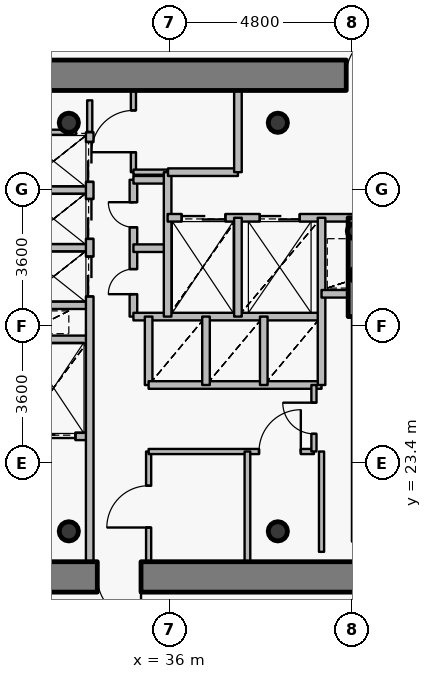
"""IFC4 building model, lengths in metres.
Left out: names, types, materials, properties, quantities, classifications, styles, units other than length and angle.
Written with IfcOpenShell. Run it as: python <this file> out.ifc"""

import sys

from ifc_helpers import new_model, si_unit, direction, frame, frame_2d, origin, origin_2d, place, context, subcontext, project, spatial, rectangle, hollow_circle, extrude, source, transform, mapped, element, fill, save


model = new_model("IFC4")
c1 = context("Model", 3, precision=1e-05, world=origin(), true_north=direction((0.0, 1.0)))
c2 = subcontext(c1, "Body", "Model", "MODEL_VIEW")
j1 = project(units=[si_unit("LENGTHUNIT", "METRE"), si_unit("PLANEANGLEUNIT", "RADIAN")], contexts=[c1])
p1 = place(None, origin())
s1 = spatial("IfcSite", under=j1, at=p1, CompositionType="ELEMENT")
p2 = place(p1, origin())
s2 = spatial("IfcBuilding", under=s1, at=p2, CompositionType="ELEMENT")
p3 = place(p2, frame((0.0, 0.0, 163.65)))
s3 = spatial("IfcBuildingStorey", under=s2, at=p3, CompositionType="ELEMENT", Elevation=163.65)
for number, where, z_axis, x_axis in (
    (1, (33.35, 21.6, 0.0), (0.0, 0.0, 1.0), (1.0, 0.0, 0.0)),
    (2, (38.85, 21.6, 0.0), (0.0, 0.0, 1.0), (1.0, 0.0, 0.0)),
    (3, (38.85, 32.35, 0.0), (0.0, 0.0, 1.0), (1.0, 0.0, 0.0)),
    (4, (33.35, 32.35, 0.0), (0.0, 0.0, 1.0), (1.0, 0.0, 0.0)),
):
    element("IfcColumn", number, at=place(p3, frame(where, z_axis=z_axis, x_axis=x_axis)), inside=s3, PredefinedType="COLUMN", context=c2, shape_type="SweptSolid", body=[
        extrude(hollow_circle(Radius=0.254, WallThickness=0.02, at=origin_2d()), origin(), (0.0, 0.0, 1.0), 3.75),
    ])
for number, where, z_axis, x_axis in (
    (5, (40.95, 28.35, 0.0), (0.0, 0.0, 1.0), (1.0, 0.0, 0.0)),
    (6, (40.88, 29.5, 0.0), (0.0, 0.0, 1.0), (1.0, 0.0, 0.0)),
):
    element("IfcColumn", number, at=place(p3, frame(where, z_axis=z_axis, x_axis=x_axis)), inside=s3, PredefinedType="COLUMN", context=c2, shape_type="SweptSolid", body=[
        extrude(hollow_circle(Radius=0.203, WallThickness=0.016, at=origin_2d()), origin(), (0.0, 0.0, 1.0), 3.75),
    ])
p4 = place(p3, frame((27.2, 33.6, 0.0), z_axis=(0.0, 0.0, 1.0), x_axis=(1.0, 0.0, 0.0)))
e7 = element("IfcWall", 7, at=p4, inside=s3, PredefinedType="SHEAR", context=c2, shape_type="SweptSolid", body=[
    extrude(rectangle(XDim=17.6, YDim=0.8, at=frame_2d((8.8, 0.0))), origin(), (0.0, 0.0, 1.0), 2.95),
])
p5 = place(p4, frame((13.45, 0.0, 0.0)))
e8 = element("IfcOpeningElement", 8, at=p5, cuts=e7, PredefinedType="OPENING", context=c2, shape_type="SweptSolid", body=[
    extrude(rectangle(XDim=1.15, YDim=2.15, at=origin_2d()), frame((0.575, 0.41, 1.075), z_axis=(0.0, -1.0, 0.0), x_axis=(1.0, 0.0, 0.0)), (0.0, 0.0, 1.0), 0.82),
])
p6 = place(p3, frame((44.8, 20.4, 0.0), z_axis=(0.0, 0.0, 1.0), x_axis=(-1.0, 0.0, 0.0)))
e9 = element("IfcWall", 9, at=p6, inside=s3, PredefinedType="SHEAR", context=c2, shape_type="SweptSolid", body=[
    extrude(rectangle(XDim=17.6, YDim=0.8, at=frame_2d((8.8, 0.0))), origin(), (0.0, 0.0, 1.0), 2.95),
])
p7 = place(p6, frame((9.55, 0.0, 0.0)))
e10 = element("IfcOpeningElement", 10, at=p7, cuts=e9, PredefinedType="OPENING", context=c2, shape_type="SweptSolid", body=[
    extrude(rectangle(XDim=1.15, YDim=2.15, at=origin_2d()), frame((0.575, 0.41, 1.075), z_axis=(0.0, -1.0, 0.0), x_axis=(1.0, 0.0, 0.0)), (0.0, 0.0, 1.0), 0.82),
])
p8 = place(p3, frame((40.9, 27.25, 0.0), z_axis=(0.0, 0.0, 1.0), x_axis=(0.0, 1.0, 0.0)))
e11 = element("IfcWall", 11, at=p8, inside=s3, PredefinedType="SHEAR", context=c2, shape_type="SweptSolid", body=[
    extrude(rectangle(XDim=2.6, YDim=0.4, at=frame_2d((1.3, 0.0))), origin(), (0.0, 0.0, 1.0), 3.1),
])
p9 = place(p3, frame((32.0, 24.1, 0.0), z_axis=(0.0, 0.0, 1.0), x_axis=(1.0, 0.0, 0.0)))
e12 = element("IfcWall", 12, at=p9, inside=s3, PredefinedType="PARTITIONING", context=c2, shape_type="SweptSolid", body=[
    extrude(rectangle(XDim=1.9, YDim=0.2, at=frame_2d((0.95, 0.0))), origin(), (0.0, 0.0, 1.0), 3.085),
])
p10 = place(p9, frame((0.375, 0.0, 0.0)))
e13 = element("IfcOpeningElement", 13, at=p10, cuts=e12, PredefinedType="OPENING", context=c2, shape_type="SweptSolid", body=[
    extrude(rectangle(XDim=1.15, YDim=2.15, at=origin_2d()), frame((0.575, 0.11, 1.075), z_axis=(0.0, -1.0, 0.0), x_axis=(1.0, 0.0, 0.0)), (0.0, 0.0, 1.0), 0.22),
])
for number, where, z_axis, x_axis in (
    (14, (32.0, 26.65, 0.0), (0.0, 0.0, 1.0), (1.0, 0.0, 0.0)),
    (15, (32.0, 27.55, 0.0), (0.0, 0.0, 1.0), (1.0, 0.0, 0.0)),
    (16, (32.0, 29.06, 0.0), (0.0, 0.0, 1.0), (1.0, 0.0, 0.0)),
    (17, (32.0, 30.58, 0.0), (0.0, 0.0, 1.0), (1.0, 0.0, 0.0)),
):
    element("IfcWall", number, at=place(p3, frame(where, z_axis=z_axis, x_axis=x_axis)), inside=s3, PredefinedType="PARTITIONING", context=c2, shape_type="SweptSolid", body=[
        extrude(rectangle(XDim=1.9, YDim=0.2, at=frame_2d((0.95, 0.0))), origin(), (0.0, 0.0, 1.0), 3.085),
    ])
p11 = place(p3, frame((33.9, 20.8, 0.0), z_axis=(0.0, 0.0, 1.0), x_axis=(0.0, 1.0, 0.0)))
e18 = element("IfcWall", 18, at=p11, inside=s3, PredefinedType="PARTITIONING", context=c2, shape_type="SweptSolid", body=[
    extrude(rectangle(XDim=11.3, YDim=0.2, at=frame_2d((5.65, 0.0))), origin(), (0.0, 0.0, 1.0), 3.085),
])
p12 = place(p11, frame((6.98, 0.0, 0.0)))
e19 = element("IfcOpeningElement", 19, at=p12, cuts=e18, PredefinedType="OPENING", context=c2, shape_type="SweptSolid", body=[
    extrude(rectangle(XDim=1.05, YDim=2.15, at=origin_2d()), frame((0.525, 0.11, 1.075), z_axis=(0.0, -1.0, 0.0), x_axis=(1.0, 0.0, 0.0)), (0.0, 0.0, 1.0), 0.22),
])
p13 = place(p11, frame((8.495, 0.0, 0.0)))
e20 = element("IfcOpeningElement", 20, at=p13, cuts=e18, PredefinedType="OPENING", context=c2, shape_type="SweptSolid", body=[
    extrude(rectangle(XDim=1.05, YDim=2.15, at=origin_2d()), frame((0.525, 0.11, 1.075), z_axis=(0.0, -1.0, 0.0), x_axis=(1.0, 0.0, 0.0)), (0.0, 0.0, 1.0), 0.22),
])
p14 = place(p11, frame((9.995, 0.0, 0.0)))
e21 = element("IfcOpeningElement", 21, at=p14, cuts=e18, PredefinedType="OPENING", context=c2, shape_type="SweptSolid", body=[
    extrude(rectangle(XDim=1.05, YDim=2.15, at=origin_2d()), frame((0.525, 0.11, 1.075), z_axis=(0.0, -1.0, 0.0), x_axis=(1.0, 0.0, 0.0)), (0.0, 0.0, 1.0), 0.22),
])
p15 = place(p3, frame((35.05, 27.25, 0.0), z_axis=(0.0, 0.0, 1.0), x_axis=(0.0, 1.0, 0.0)))
e22 = element("IfcWall", 22, at=p15, inside=s3, PredefinedType="PARTITIONING", context=c2, shape_type="SweptSolid", body=[
    extrude(rectangle(XDim=3.6, YDim=0.2, at=frame_2d((1.8, 0.0))), origin(), (0.0, 0.0, 1.0), 3.5),
])
p16 = place(p15, frame((0.59, 0.0, 0.0)))
e23 = element("IfcOpeningElement", 23, at=p16, cuts=e22, PredefinedType="OPENING", context=c2, shape_type="SweptSolid", body=[
    extrude(rectangle(XDim=0.66, YDim=2.05, at=origin_2d()), frame((0.33, 0.11, 1.025), z_axis=(0.0, -1.0, 0.0), x_axis=(1.0, 0.0, 0.0)), (0.0, 0.0, 1.0), 0.22),
])
p17 = place(p15, frame((2.35, 0.0, 0.0)))
e24 = element("IfcOpeningElement", 24, at=p17, cuts=e22, PredefinedType="OPENING", context=c2, shape_type="SweptSolid", body=[
    extrude(rectangle(XDim=0.66, YDim=2.05, at=origin_2d()), frame((0.33, 0.11, 1.025), z_axis=(0.0, -1.0, 0.0), x_axis=(1.0, 0.0, 0.0)), (0.0, 0.0, 1.0), 0.22),
])
p18 = place(p3, frame((35.05, 27.25, 0.0), z_axis=(0.0, 0.0, 1.0), x_axis=(1.0, 0.0, 0.0)))
e25 = element("IfcWall", 25, at=p18, inside=s3, PredefinedType="PARTITIONING", context=c2, shape_type="SweptSolid", body=[
    extrude(rectangle(XDim=4.95, YDim=0.2, at=frame_2d((2.475, 0.0))), origin(), (0.0, 0.0, 1.0), 3.085),
])
for number, where, z_axis, x_axis in (
    (26, (35.05, 29.05, 0.0), (0.0, 0.0, 1.0), (1.0, 0.0, 0.0)),
    (27, (35.05, 30.85, 0.0), (0.0, 0.0, 1.0), (1.0, 0.0, 0.0)),
):
    element("IfcWall", number, at=place(p3, frame(where, z_axis=z_axis, x_axis=x_axis)), inside=s3, PredefinedType="PARTITIONING", context=c2, shape_type="SweptSolid", body=[
        extrude(rectangle(XDim=0.9, YDim=0.2, at=frame_2d((0.45, 0.0))), origin(), (0.0, 0.0, 1.0), 3.5),
    ])
p19 = place(p3, frame((35.05, 31.05, 0.0), z_axis=(0.0, 0.0, 1.0), x_axis=(0.0, 1.0, 0.0)))
e28 = element("IfcWall", 28, at=p19, inside=s3, PredefinedType="PARTITIONING", context=c2, shape_type="SweptSolid", body=[
    extrude(rectangle(XDim=2.15, YDim=0.135, at=frame_2d((1.075, 0.0))), origin(), (0.0, 0.0, 1.0), 3.085),
])
p20 = place(p19, frame((0.525, 0.0, 0.0)))
e29 = element("IfcOpeningElement", 29, at=p20, cuts=e28, PredefinedType="OPENING", context=c2, shape_type="SweptSolid", body=[
    extrude(rectangle(XDim=1.1, YDim=2.15, at=origin_2d()), frame((0.55, 0.078, 1.075), z_axis=(0.0, -1.0, 0.0), x_axis=(1.0, 0.0, 0.0)), (0.0, 0.0, 1.0), 0.155),
])
p21 = place(p3, frame((35.05, 31.05, 0.0), z_axis=(0.0, 0.0, 1.0), x_axis=(1.0, 0.0, 0.0)))
e30 = element("IfcWall", 30, at=p21, inside=s3, PredefinedType="PARTITIONING", context=c2, shape_type="SweptSolid", body=[
    extrude(rectangle(XDim=0.9, YDim=0.135, at=frame_2d((0.45, 0.0))), origin(), (0.0, 0.0, 1.0), 3.5),
])
p22 = place(p3, frame((35.45, 20.8, 0.0), z_axis=(0.0, 0.0, 1.0), x_axis=(0.0, 1.0, 0.0)))
e31 = element("IfcWall", 31, at=p22, inside=s3, PredefinedType="PARTITIONING", context=c2, shape_type="SweptSolid", body=[
    extrude(rectangle(XDim=2.9, YDim=0.135, at=frame_2d((1.45, 0.0))), origin(), (0.0, 0.0, 1.0), 3.085),
])
p23 = place(p22, frame((0.9, 0.0, 0.0)))
e32 = element("IfcOpeningElement", 32, at=p23, cuts=e31, PredefinedType="OPENING", context=c2, shape_type="SweptSolid", body=[
    extrude(rectangle(XDim=1.1, YDim=2.15, at=origin_2d()), frame((0.55, 0.078, 1.075), z_axis=(0.0, -1.0, 0.0), x_axis=(1.0, 0.0, 0.0)), (0.0, 0.0, 1.0), 0.155),
])
p24 = place(p3, frame((35.45, 23.7, 0.0), z_axis=(0.0, 0.0, 1.0), x_axis=(1.0, 0.0, 0.0)))
e33 = element("IfcWall", 33, at=p24, inside=s3, PredefinedType="PARTITIONING", context=c2, shape_type="SweptSolid", body=[
    extrude(rectangle(XDim=4.35, YDim=0.135, at=frame_2d((2.175, 0.0))), origin(), (0.0, 0.0, 1.0), 3.085),
])
p25 = place(p24, frame((2.905, 0.0, 0.0)))
e34 = element("IfcOpeningElement", 34, at=p25, cuts=e33, PredefinedType="OPENING", context=c2, shape_type="SweptSolid", body=[
    extrude(rectangle(XDim=1.1, YDim=2.15, at=origin_2d()), frame((0.55, 0.078, 1.075), z_axis=(0.0, -1.0, 0.0), x_axis=(1.0, 0.0, 0.0)), (0.0, 0.0, 1.0), 0.155),
])
p26 = place(p3, frame((35.45, 25.45, 0.0), z_axis=(0.0, 0.0, 1.0), x_axis=(0.0, 1.0, 0.0)))
e35 = element("IfcWall", 35, at=p26, inside=s3, PredefinedType="PARTITIONING", context=c2, shape_type="SweptSolid", body=[
    extrude(rectangle(XDim=1.8, YDim=0.2, at=frame_2d((0.9, 0.0))), origin(), (0.0, 0.0, 1.0), 3.5),
])
p27 = place(p3, frame((35.45, 25.45, 0.0), z_axis=(0.0, 0.0, 1.0), x_axis=(1.0, 0.0, 0.0)))
e36 = element("IfcWall", 36, at=p27, inside=s3, PredefinedType="PARTITIONING", context=c2, shape_type="SweptSolid", body=[
    extrude(rectangle(XDim=4.55, YDim=0.2, at=frame_2d((2.275, 0.0))), origin(), (0.0, 0.0, 1.0), 3.085),
])
p28 = place(p3, frame((35.95, 27.25, 0.0), z_axis=(0.0, 0.0, 1.0), x_axis=(0.0, 1.0, 0.0)))
e37 = element("IfcWall", 37, at=p28, inside=s3, PredefinedType="PARTITIONING", context=c2, shape_type="SweptSolid", body=[
    extrude(rectangle(XDim=3.8, YDim=0.2, at=frame_2d((1.9, 0.0))), origin(), (0.0, 0.0, 1.0), 3.5),
])
p29 = place(p3, frame((35.95, 29.85, 0.0), z_axis=(0.0, 0.0, 1.0), x_axis=(1.0, 0.0, 0.0)))
e38 = element("IfcWall", 38, at=p29, inside=s3, PredefinedType="PARTITIONING", context=c2, shape_type="SweptSolid", body=[
    extrude(rectangle(XDim=8.49, YDim=0.2, at=frame_2d((4.245, 0.0))), origin(), (0.0, 0.0, 1.0), 3.085),
])
p30 = place(p29, frame((6.1, 0.0, 0.0)))
e39 = element("IfcOpeningElement", 39, at=p30, cuts=e38, PredefinedType="OPENING", context=c2, shape_type="SweptSolid", body=[
    extrude(rectangle(XDim=1.2, YDim=2.15, at=origin_2d()), frame((0.6, 0.11, 1.075), z_axis=(0.0, -1.0, 0.0), x_axis=(1.0, 0.0, 0.0)), (0.0, 0.0, 1.0), 0.22),
])
p31 = place(p29, frame((0.37, 0.0, 0.0)))
e40 = element("IfcOpeningElement", 40, at=p31, cuts=e38, PredefinedType="OPENING", context=c2, shape_type="SweptSolid", body=[
    extrude(rectangle(XDim=1.15, YDim=2.15, at=origin_2d()), frame((0.575, 0.11, 1.075), z_axis=(0.0, -1.0, 0.0), x_axis=(1.0, 0.0, 0.0)), (0.0, 0.0, 1.0), 0.22),
])
p32 = place(p29, frame((2.425, 0.0, 0.0)))
e41 = element("IfcOpeningElement", 41, at=p32, cuts=e38, PredefinedType="OPENING", context=c2, shape_type="SweptSolid", body=[
    extrude(rectangle(XDim=1.05, YDim=2.15, at=origin_2d()), frame((0.525, 0.11, 1.075), z_axis=(0.0, -1.0, 0.0), x_axis=(1.0, 0.0, 0.0)), (0.0, 0.0, 1.0), 0.22),
])
p33 = place(p3, frame((35.96, 31.05, 0.0), z_axis=(0.0, 0.0, 1.0), x_axis=(1.0, 0.0, 0.0)))
e42 = element("IfcWall", 42, at=p33, inside=s3, PredefinedType="PARTITIONING", context=c2, shape_type="SweptSolid", body=[
    extrude(rectangle(XDim=1.84, YDim=0.2, at=frame_2d((0.92, 0.0))), origin(), (0.0, 0.0, 1.0), 3.5),
])
p34 = place(p3, frame((36.96, 25.45, 0.0), z_axis=(0.0, 0.0, 1.0), x_axis=(0.0, 1.0, 0.0)))
e43 = element("IfcWall", 43, at=p34, inside=s3, PredefinedType="PARTITIONING", context=c2, shape_type="SweptSolid", body=[
    extrude(rectangle(XDim=1.8, YDim=0.2, at=frame_2d((0.9, 0.0))), origin(), (0.0, 0.0, 1.0), 3.5),
])
p35 = place(p3, frame((37.8, 27.25, 0.0), z_axis=(0.0, 0.0, 1.0), x_axis=(0.0, 1.0, 0.0)))
e44 = element("IfcWall", 44, at=p35, inside=s3, PredefinedType="PARTITIONING", context=c2, shape_type="SweptSolid", body=[
    extrude(rectangle(XDim=2.6, YDim=0.2, at=frame_2d((1.3, 0.0))), origin(), (0.0, 0.0, 1.0), 3.5),
])
p36 = place(p3, frame((37.8, 31.05, 0.0), z_axis=(0.0, 0.0, 1.0), x_axis=(0.0, 1.0, 0.0)))
e45 = element("IfcWall", 45, at=p36, inside=s3, PredefinedType="PARTITIONING", context=c2, shape_type="SweptSolid", body=[
    extrude(rectangle(XDim=2.15, YDim=0.2, at=frame_2d((1.075, 0.0))), origin(), (0.0, 0.0, 1.0), 3.085),
])
p37 = place(p3, frame((38.05, 20.18, 0.0), z_axis=(0.0, 0.0, 1.0), x_axis=(0.0, 1.0, 0.0)))
e46 = element("IfcWall", 46, at=p37, inside=s3, PredefinedType="PARTITIONING", context=c2, shape_type="SweptSolid", body=[
    extrude(rectangle(XDim=3.52, YDim=0.15, at=frame_2d((1.76, 0.0))), origin(), (0.0, 0.0, 1.0), 2.935),
])
p38 = place(p3, frame((38.48, 25.45, 0.0), z_axis=(0.0, 0.0, 1.0), x_axis=(0.0, 1.0, 0.0)))
e47 = element("IfcWall", 47, at=p38, inside=s3, PredefinedType="PARTITIONING", context=c2, shape_type="SweptSolid", body=[
    extrude(rectangle(XDim=1.8, YDim=0.2, at=frame_2d((0.9, 0.0))), origin(), (0.0, 0.0, 1.0), 3.5),
])
p39 = place(p3, frame((39.8, 23.7, 0.0), z_axis=(0.0, 0.0, 1.0), x_axis=(0.0, 1.0, 0.0)))
e48 = element("IfcWall", 48, at=p39, inside=s3, PredefinedType="PARTITIONING", context=c2, shape_type="SweptSolid", body=[
    extrude(rectangle(XDim=1.75, YDim=0.135, at=frame_2d((0.875, 0.0))), origin(), (0.0, 0.0, 1.0), 3.5),
])
p40 = place(p39, frame((0.465, 0.0, 0.0)))
e49 = element("IfcOpeningElement", 49, at=p40, cuts=e48, PredefinedType="OPENING", context=c2, shape_type="SweptSolid", body=[
    extrude(rectangle(XDim=0.82, YDim=2.1, at=origin_2d()), frame((0.41, 0.078, 1.05), z_axis=(0.0, -1.0, 0.0), x_axis=(1.0, 0.0, 0.0)), (0.0, 0.0, 1.0), 0.155),
])
p41 = place(p3, frame((40.0, 25.45, 0.0), z_axis=(0.0, 0.0, 1.0), x_axis=(0.0, 1.0, 0.0)))
e50 = element("IfcWall", 50, at=p41, inside=s3, PredefinedType="PARTITIONING", context=c2, shape_type="SweptSolid", body=[
    extrude(rectangle(XDim=4.4, YDim=0.2, at=frame_2d((2.2, 0.0))), origin(), (0.0, 0.0, 1.0), 3.5),
])
p42 = place(p3, frame((40.0, 27.85, 0.0), z_axis=(0.0, 0.0, 1.0), x_axis=(1.0, 0.0, 0.0)))
e51 = element("IfcWall", 51, at=p42, inside=s3, PredefinedType="PARTITIONING", context=c2, shape_type="SweptSolid", body=[
    extrude(rectangle(XDim=0.9, YDim=0.2, at=frame_2d((0.45, 0.0))), origin(), (0.0, 0.0, 1.0), 3.5),
])
p43 = place(p3, frame((40.9, 21.33, 0.0), z_axis=(0.0, 0.0, 1.0), x_axis=(0.0, 1.0, 0.0)))
e52 = element("IfcWall", 52, at=p43, inside=s3, PredefinedType="PARTITIONING", context=c2, shape_type="SweptSolid", body=[
    extrude(rectangle(XDim=5.91, YDim=0.2, at=frame_2d((2.955, 0.0))), origin(), (0.0, 0.0, 1.0), 3.035),
])
p44 = place(p3, frame((32.36, 32.1, 0.0), z_axis=(0.0, 0.0, 1.0), x_axis=(1.0, 0.0, 0.0)))
e53 = element("IfcWall", 53, at=p44, inside=s3, PredefinedType="PARTITIONING", context=c2, shape_type="SweptSolid", body=[
    extrude(rectangle(XDim=1.18, YDim=0.135, at=frame_2d((0.59, 0.0))), origin(), (0.0, 0.0, 1.0), 3.085),
])
p45 = place(p3, frame((40.0, 23.7, 0.0), z_axis=(0.0, 0.0, 1.0), x_axis=(0.0, -1.0, 0.0)))
e54 = element("IfcWall", 54, at=p45, inside=s3, PredefinedType="PARTITIONING", context=c2, shape_type="SweptSolid", body=[
    extrude(rectangle(XDim=2.64, YDim=0.135, at=frame_2d((1.32, 0.0))), origin(), (0.0, 0.0, 1.0), 3.035),
])
p46 = place(p3, frame((33.9, 32.11, 0.0), z_axis=(0.0, 0.0, 1.0), x_axis=(0.0, 1.0, 0.0)))
e55 = element("IfcWall", 55, at=p46, inside=s3, PredefinedType="PARTITIONING", context=c2, shape_type="SweptSolid", body=[
    extrude(rectangle(XDim=0.83, YDim=0.135, at=frame_2d((0.415, 0.0))), origin(), (0.0, 0.0, 1.0), 3.085),
])
m1 = source(origin(), c2, "Body", "SweptSolid", [
    extrude(rectangle(XDim=1.15, YDim=2.15, at=origin_2d()), frame((0.575, 0.025, 1.075), z_axis=(0.0, -1.0, 0.0), x_axis=(1.0, 0.0, 0.0)), (0.0, 0.0, 1.0), 0.05),
])
p47 = place(p5, origin())
e56 = element("IfcDoor", 56, at=p47, inside=s3, OperationType="SINGLE_SWING_RIGHT", PredefinedType="DOOR", context=c2, shape_type="MappedRepresentation", body=[
    mapped(m1, transform((0.0, 0.0, 0.0), x_axis=(1.0, 0.0, 0.0), y_axis=(0.0, 1.0, 0.0), z_axis=(0.0, 0.0, 1.0), scale=1.0)),
])
fill(e8, e56)
p48 = place(p7, origin())
e57 = element("IfcDoor", 57, at=p48, inside=s3, OperationType="SINGLE_SWING_LEFT", PredefinedType="DOOR", context=c2, shape_type="MappedRepresentation", body=[
    mapped(m1, transform((0.0, 0.0, 0.0), x_axis=(1.0, 0.0, 0.0), y_axis=(0.0, 1.0, 0.0), z_axis=(0.0, 0.0, 1.0), scale=1.0)),
])
fill(e10, e57)
m2 = source(origin(), c2, "Body", "SweptSolid", [
    extrude(rectangle(XDim=1.15, YDim=2.15, at=origin_2d()), frame((0.575, 0.025, 1.075), z_axis=(0.0, -1.0, 0.0), x_axis=(1.0, 0.0, 0.0)), (0.0, 0.0, 1.0), 0.05),
])
p49 = place(p31, origin())
e58 = element("IfcDoor", 58, at=p49, inside=s3, OperationType="DOUBLE_DOOR_SLIDING", PredefinedType="USERDEFINED", context=c2, shape_type="MappedRepresentation", body=[
    mapped(m2, transform((0.0, 0.0, 0.0), x_axis=(1.0, 0.0, 0.0), y_axis=(0.0, 1.0, 0.0), z_axis=(0.0, 0.0, 1.0), scale=1.0)),
])
fill(e40, e58)
p50 = place(p10, origin())
e59 = element("IfcDoor", 59, at=p50, inside=s3, OperationType="DOUBLE_DOOR_SLIDING", PredefinedType="USERDEFINED", context=c2, shape_type="MappedRepresentation", body=[
    mapped(m2, transform((0.0, 0.0, 0.0), x_axis=(1.0, 0.0, 0.0), y_axis=(0.0, 1.0, 0.0), z_axis=(0.0, 0.0, 1.0), scale=1.0)),
])
fill(e13, e59)
m3 = source(origin(), c2, "Body", "SweptSolid", [
    extrude(rectangle(XDim=1.05, YDim=2.15, at=origin_2d()), frame((0.525, 0.025, 1.075), z_axis=(0.0, -1.0, 0.0), x_axis=(1.0, 0.0, 0.0)), (0.0, 0.0, 1.0), 0.05),
])
p51 = place(p32, origin())
e60 = element("IfcDoor", 60, at=p51, inside=s3, OperationType="DOUBLE_DOOR_SLIDING", PredefinedType="USERDEFINED", context=c2, shape_type="MappedRepresentation", body=[
    mapped(m3, transform((0.0, 0.0, 0.0), x_axis=(1.0, 0.0, 0.0), y_axis=(0.0, 1.0, 0.0), z_axis=(0.0, 0.0, 1.0), scale=1.0)),
])
fill(e41, e60)
p52 = place(p12, origin())
e61 = element("IfcDoor", 61, at=p52, inside=s3, OperationType="DOUBLE_DOOR_SLIDING", PredefinedType="USERDEFINED", context=c2, shape_type="MappedRepresentation", body=[
    mapped(m3, transform((0.0, 0.0, 0.0), x_axis=(1.0, 0.0, 0.0), y_axis=(0.0, 1.0, 0.0), z_axis=(0.0, 0.0, 1.0), scale=1.0)),
])
fill(e19, e61)
p53 = place(p13, origin())
e62 = element("IfcDoor", 62, at=p53, inside=s3, OperationType="DOUBLE_DOOR_SLIDING", PredefinedType="USERDEFINED", context=c2, shape_type="MappedRepresentation", body=[
    mapped(m3, transform((0.0, 0.0, 0.0), x_axis=(1.0, 0.0, 0.0), y_axis=(0.0, 1.0, 0.0), z_axis=(0.0, 0.0, 1.0), scale=1.0)),
])
fill(e20, e62)
p54 = place(p14, origin())
e63 = element("IfcDoor", 63, at=p54, inside=s3, OperationType="DOUBLE_DOOR_SLIDING", PredefinedType="USERDEFINED", context=c2, shape_type="MappedRepresentation", body=[
    mapped(m3, transform((0.0, 0.0, 0.0), x_axis=(1.0, 0.0, 0.0), y_axis=(0.0, 1.0, 0.0), z_axis=(0.0, 0.0, 1.0), scale=1.0)),
])
fill(e21, e63)
m4 = source(origin(), c2, "Body", "SweptSolid", [
    extrude(rectangle(XDim=0.66, YDim=2.05, at=origin_2d()), frame((0.33, 0.025, 1.025), z_axis=(0.0, -1.0, 0.0), x_axis=(1.0, 0.0, 0.0)), (0.0, 0.0, 1.0), 0.05),
])
p55 = place(p16, origin())
e64 = element("IfcDoor", 64, at=p55, inside=s3, OperationType="SINGLE_SWING_LEFT", PredefinedType="USERDEFINED", context=c2, shape_type="MappedRepresentation", body=[
    mapped(m4, transform((0.0, 0.0, 0.0), x_axis=(1.0, 0.0, 0.0), y_axis=(0.0, 1.0, 0.0), z_axis=(0.0, 0.0, 1.0), scale=1.0)),
])
fill(e23, e64)
p56 = place(p17, origin())
e65 = element("IfcDoor", 65, at=p56, inside=s3, OperationType="SINGLE_SWING_RIGHT", PredefinedType="USERDEFINED", context=c2, shape_type="MappedRepresentation", body=[
    mapped(m4, transform((0.0, 0.0, 0.0), x_axis=(1.0, 0.0, 0.0), y_axis=(0.0, 1.0, 0.0), z_axis=(0.0, 0.0, 1.0), scale=1.0)),
])
fill(e24, e65)
m5 = source(origin(), c2, "Body", "SweptSolid", [
    extrude(rectangle(XDim=1.1, YDim=2.15, at=origin_2d()), frame((0.55, 0.025, 1.075), z_axis=(0.0, -1.0, 0.0), x_axis=(1.0, 0.0, 0.0)), (0.0, 0.0, 1.0), 0.05),
])
p57 = place(p23, origin())
e66 = element("IfcDoor", 66, at=p57, inside=s3, OperationType="SINGLE_SWING_LEFT", PredefinedType="DOOR", context=c2, shape_type="MappedRepresentation", body=[
    mapped(m5, transform((0.0, 0.0, 0.0), x_axis=(1.0, 0.0, 0.0), y_axis=(0.0, 1.0, 0.0), z_axis=(0.0, 0.0, 1.0), scale=1.0)),
])
fill(e32, e66)
p58 = place(p25, origin())
e67 = element("IfcDoor", 67, at=p58, inside=s3, OperationType="SINGLE_SWING_RIGHT", PredefinedType="DOOR", context=c2, shape_type="MappedRepresentation", body=[
    mapped(m5, transform((0.0, 0.0, 0.0), x_axis=(1.0, 0.0, 0.0), y_axis=(0.0, 1.0, 0.0), z_axis=(0.0, 0.0, 1.0), scale=1.0)),
])
fill(e34, e67)
p59 = place(p20, origin())
e68 = element("IfcDoor", 68, at=p59, inside=s3, OperationType="SINGLE_SWING_LEFT", PredefinedType="DOOR", context=c2, shape_type="MappedRepresentation", body=[
    mapped(m5, transform((0.0, 0.0, 0.0), x_axis=(1.0, 0.0, 0.0), y_axis=(0.0, 1.0, 0.0), z_axis=(0.0, 0.0, 1.0), scale=1.0)),
])
fill(e29, e68)
m6 = source(origin(), c2, "Body", "SweptSolid", [
    extrude(rectangle(XDim=0.82, YDim=2.1, at=origin_2d()), frame((0.41, 0.025, 1.05), z_axis=(0.0, -1.0, 0.0), x_axis=(1.0, 0.0, 0.0)), (0.0, 0.0, 1.0), 0.05),
])
p60 = place(p40, origin())
e69 = element("IfcDoor", 69, at=p60, inside=s3, OperationType="SINGLE_SWING_RIGHT", PredefinedType="DOOR", context=c2, shape_type="MappedRepresentation", body=[
    mapped(m6, transform((0.0, 0.0, 0.0), x_axis=(1.0, 0.0, 0.0), y_axis=(0.0, 1.0, 0.0), z_axis=(0.0, 0.0, 1.0), scale=1.0)),
])
fill(e49, e69)
save(model, sys.argv[1])
